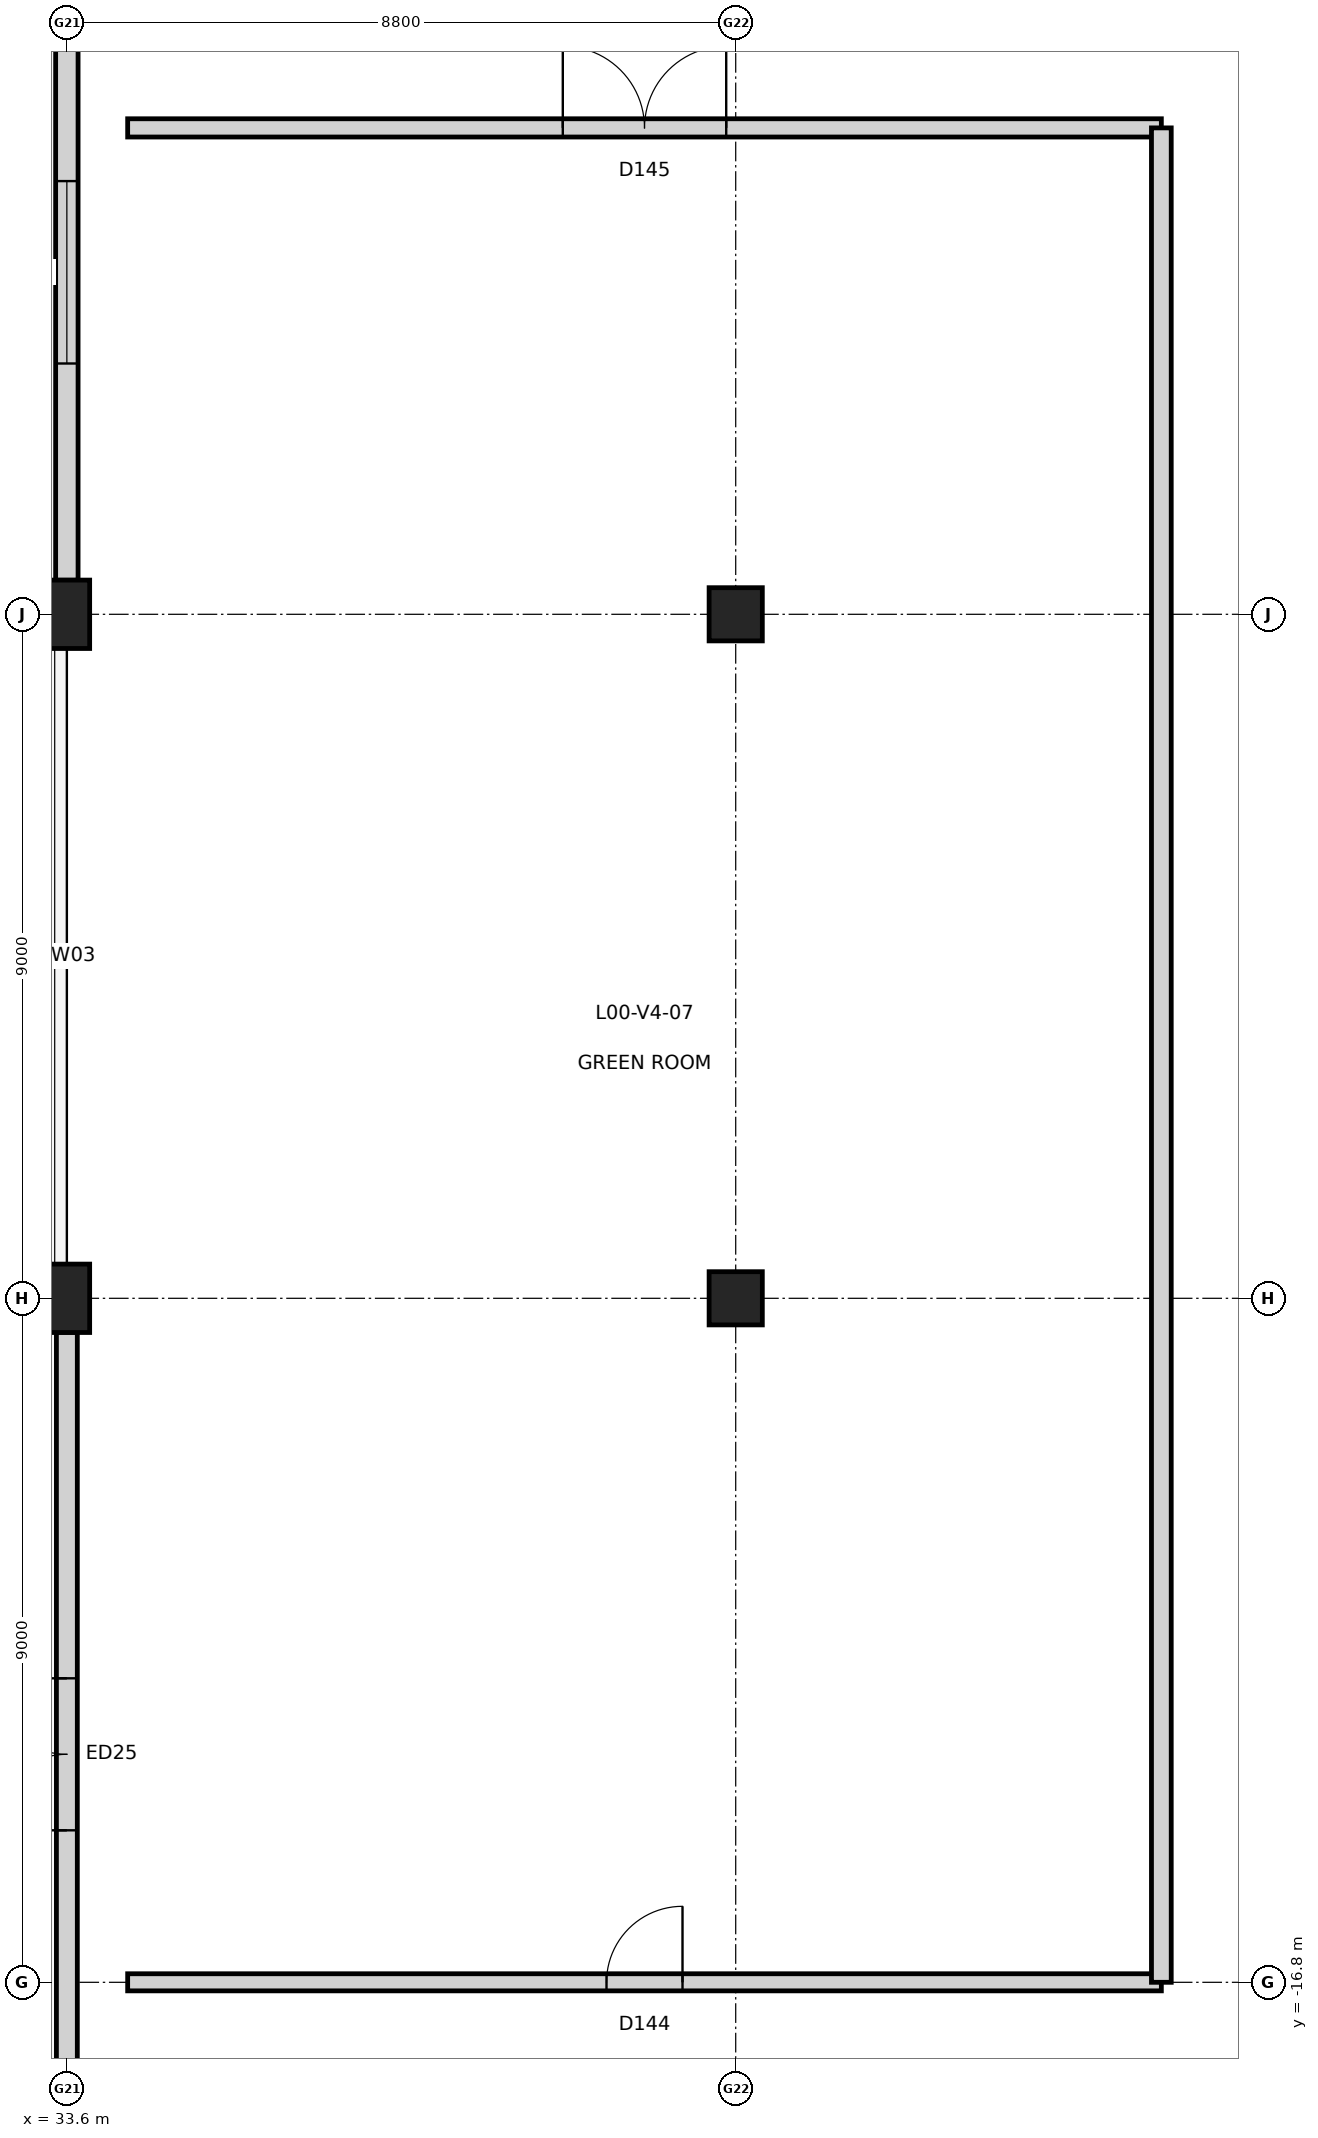
"""IFC4 building model, lengths in metres.
Left out: names, types, materials, properties, quantities, classifications, styles, units other than length and angle.
Written with IfcOpenShell. Run it as: python <this file> out.ifc"""

import sys

from ifc_helpers import new_model, si_unit, direction, frame, frame_2d, origin, origin_2d, place, context, subcontext, project, spatial, rectangle, extrude, element, fill, save


model = new_model("IFC4")
c1 = context("Model", 3, precision=1e-05, world=origin(), true_north=direction((0.0, 1.0)))
c2 = subcontext(c1, "Body", "Model", "MODEL_VIEW")
j1 = project(units=[si_unit("LENGTHUNIT", "METRE"), si_unit("PLANEANGLEUNIT", "RADIAN")], contexts=[c1])
p1 = place(None, origin())
s1 = spatial("IfcSite", under=j1, at=p1, CompositionType="ELEMENT")
p2 = place(p1, origin())
s2 = spatial("IfcBuilding", under=s1, at=p2, CompositionType="ELEMENT")
p3 = place(p2, origin())
s3 = spatial("IfcBuildingStorey", under=s2, at=p3, CompositionType="ELEMENT", Elevation=0.0)
for number, where, z_axis, x_axis in (
    (1, (33.6, -7.8, 0.0), (0.0, 0.0, 1.0), (1.0, 0.0, 0.0)),
    (2, (33.6, 1.2, 0.0), (0.0, 0.0, 1.0), (1.0, 0.0, 0.0)),
):
    element("IfcColumn", number, at=place(p3, frame(where, z_axis=z_axis, x_axis=x_axis)), inside=s3, PredefinedType="COLUMN", context=c2, shape_type="SweptSolid", body=[
        extrude(rectangle(XDim=0.6, YDim=0.9, at=origin_2d()), origin(), (0.0, 0.0, 1.0), 5.4),
    ])
for number, where, z_axis, x_axis in (
    (3, (42.4, -7.8, 0.0), (0.0, 0.0, 1.0), (1.0, 0.0, 0.0)),
    (4, (42.4, 1.2, 0.0), (0.0, 0.0, 1.0), (1.0, 0.0, 0.0)),
):
    element("IfcColumn", number, at=place(p3, frame(where, z_axis=z_axis, x_axis=x_axis)), inside=s3, PredefinedType="COLUMN", context=c2, shape_type="SweptSolid", body=[
        extrude(rectangle(XDim=0.7, YDim=0.7, at=origin_2d()), origin(), (0.0, 0.0, 1.0), 5.4),
    ])
p4 = place(p3, frame((33.6, -19.352, 0.0), z_axis=(0.0, 0.0, 1.0), x_axis=(0.0, 1.0, 0.0)))
e5 = element("IfcWall", 5, at=p4, inside=s3, PredefinedType="STANDARD", context=c2, shape_type="SweptSolid", body=[
    extrude(rectangle(XDim=11.104, YDim=0.275, at=frame_2d((5.552, 0.0))), origin(), (0.0, 0.0, 1.0), 4.32),
])
p5 = place(p4, frame((4.552, 0.0, 0.0)))
e6 = element("IfcOpeningElement", 6, at=p5, cuts=e5, PredefinedType="OPENING", context=c2, shape_type="SweptSolid", body=[
    extrude(rectangle(XDim=2.0, YDim=2.4, at=frame_2d((1.0, 1.2))), frame((0.0, 0.147, 0.0), z_axis=(0.0, -1.0, 0.0), x_axis=(1.0, 0.0, 0.0)), (0.0, 0.0, 1.0), 0.295),
])
p6 = place(p3, frame((33.6, 1.648, 0.0), z_axis=(0.0, 0.0, 1.0), x_axis=(0.0, 1.0, 0.0)))
e7 = element("IfcWall", 7, at=p6, inside=s3, PredefinedType="STANDARD", context=c2, shape_type="SweptSolid", body=[
    extrude(rectangle(XDim=8.104, YDim=0.295, at=frame_2d((4.052, 0.0))), origin(), (0.0, 0.0, 1.0), 4.404),
])
p7 = place(p6, frame((2.852, 0.0, 0.6)))
e8 = element("IfcOpeningElement", 8, at=p7, cuts=e7, PredefinedType="OPENING", context=c2, shape_type="SweptSolid", body=[
    extrude(rectangle(XDim=2.4, YDim=2.35, at=frame_2d((1.2, 1.175))), frame((0.0, 0.157, 0.0), z_axis=(0.0, -1.0, 0.0), x_axis=(1.0, 0.0, 0.0)), (0.0, 0.0, 1.0), 0.315),
])
p8 = place(p3, frame((34.4, -16.8, 0.0), z_axis=(0.0, 0.0, 1.0), x_axis=(1.0, 0.0, 0.0)))
e9 = element("IfcWall", 9, at=p8, inside=s3, PredefinedType="PARTITIONING", context=c2, shape_type="SweptSolid", body=[
    extrude(rectangle(XDim=13.6, YDim=0.225, at=frame_2d((6.8, 0.0))), origin(), (0.0, 0.0, 1.0), 5.02),
])
p9 = place(p8, frame((6.3, 0.0, 0.0)))
e10 = element("IfcOpeningElement", 10, at=p9, cuts=e9, PredefinedType="OPENING", context=c2, shape_type="SweptSolid", body=[
    extrude(rectangle(XDim=1.0, YDim=2.25, at=frame_2d((0.5, 1.125))), frame((0.0, 0.123, 0.0), z_axis=(0.0, -1.0, 0.0), x_axis=(1.0, 0.0, 0.0)), (0.0, 0.0, 1.0), 0.245),
])
p10 = place(p3, frame((34.4, 7.6, 0.0), z_axis=(0.0, 0.0, 1.0), x_axis=(1.0, 0.0, 0.0)))
e11 = element("IfcWall", 11, at=p10, inside=s3, PredefinedType="PARTITIONING", context=c2, shape_type="SweptSolid", body=[
    extrude(rectangle(XDim=13.6, YDim=0.24, at=frame_2d((6.8, 0.0))), origin(), (0.0, 0.0, 1.0), 5.02),
])
p11 = place(p10, frame((5.725, 0.0, 0.0)))
e12 = element("IfcOpeningElement", 12, at=p11, cuts=e11, PredefinedType="OPENING", context=c2, shape_type="SweptSolid", body=[
    extrude(rectangle(XDim=2.15, YDim=2.4, at=frame_2d((1.075, 1.2))), frame((0.0, 0.13, 0.0), z_axis=(0.0, -1.0, 0.0), x_axis=(1.0, 0.0, 0.0)), (0.0, 0.0, 1.0), 0.26),
])
p12 = place(p3, frame((48.0, -16.8, 0.0), z_axis=(0.0, 0.0, 1.0), x_axis=(0.0, 1.0, 0.0)))
e13 = element("IfcWall", 13, at=p12, inside=s3, PredefinedType="PARTITIONING", context=c2, shape_type="SweptSolid", body=[
    extrude(rectangle(XDim=24.4, YDim=0.26, at=frame_2d((12.2, 0.0))), origin(), (0.0, 0.0, 1.0), 4.543),
])
p13 = place(p5, origin())
e14 = element("IfcDoor", 14, at=p13, inside=s3, OperationType="DOUBLE_DOOR_SINGLE_SWING", PredefinedType="DOOR", context=c2, shape_type="SweptSolid", body=[
    extrude(rectangle(XDim=2.0, YDim=2.4, at=frame_2d((1.0, 1.2))), frame((0.0, 0.025, 0.0), z_axis=(0.0, -1.0, 0.0), x_axis=(1.0, 0.0, 0.0)), (0.0, 0.0, 1.0), 0.05),
])
fill(e6, e14)
p14 = place(p7, origin())
e15 = element("IfcWindow", 15, at=p14, inside=s3, PartitioningType="SINGLE_PANEL", PredefinedType="WINDOW", context=c2, shape_type="SweptSolid", body=[
    extrude(rectangle(XDim=2.4, YDim=2.35, at=frame_2d((1.2, 1.175))), frame((0.0, 0.03, 0.0), z_axis=(0.0, -1.0, 0.0), x_axis=(1.0, 0.0, 0.0)), (0.0, 0.0, 1.0), 0.06),
])
fill(e8, e15)
p15 = place(p9, origin())
e16 = element("IfcDoor", 16, at=p15, inside=s3, OperationType="SINGLE_SWING_RIGHT", PredefinedType="DOOR", context=c2, shape_type="SweptSolid", body=[
    extrude(rectangle(XDim=1.0, YDim=2.25, at=frame_2d((0.5, 1.125))), frame((0.0, 0.025, 0.0), z_axis=(0.0, -1.0, 0.0), x_axis=(1.0, 0.0, 0.0)), (0.0, 0.0, 1.0), 0.05),
])
fill(e10, e16)
p16 = place(p11, origin())
e17 = element("IfcDoor", 17, at=p16, inside=s3, OperationType="DOUBLE_DOOR_SINGLE_SWING", PredefinedType="DOOR", context=c2, shape_type="SweptSolid", body=[
    extrude(rectangle(XDim=2.15, YDim=2.4, at=frame_2d((1.075, 1.2))), frame((0.0, 0.025, 0.0), z_axis=(0.0, -1.0, 0.0), x_axis=(1.0, 0.0, 0.0)), (0.0, 0.0, 1.0), 0.05),
])
fill(e12, e17)
save(model, sys.argv[1])
